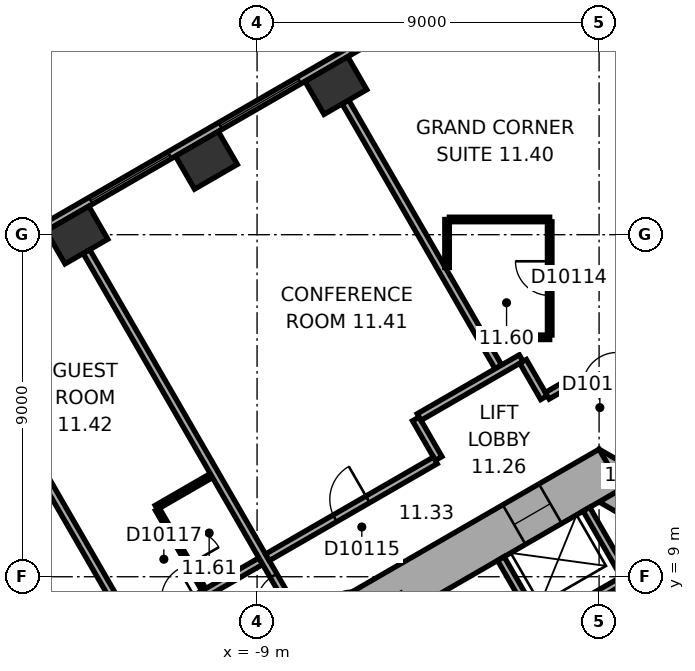
"""IFC4 building model, lengths in metres.
Left out: names, types, materials, properties, quantities, classifications, styles, units other than length and angle.
Written with IfcOpenShell. Run it as: python <this file> out.ifc"""

import sys

from ifc_helpers import new_model, si_unit, direction, frame, frame_2d, origin, origin_2d, place, context, subcontext, project, spatial, rectangle, extrude, element, fill, save


model = new_model("IFC4")
c1 = context("Model", 3, precision=1e-05, world=origin(), true_north=direction((0.0, 1.0)))
c2 = subcontext(c1, "Body", "Model", "MODEL_VIEW")
j1 = project(units=[si_unit("LENGTHUNIT", "METRE"), si_unit("PLANEANGLEUNIT", "RADIAN")], contexts=[c1])
p1 = place(None, origin())
s1 = spatial("IfcSite", under=j1, at=p1, CompositionType="ELEMENT")
p2 = place(p1, origin())
s2 = spatial("IfcBuilding", under=s1, at=p2, CompositionType="ELEMENT")
p3 = place(p2, frame((0.0, 0.0, 57.2)))
s3 = spatial("IfcBuildingStorey", under=s2, at=p3, CompositionType="ELEMENT", Elevation=57.2)
for number, where, z_axis, x_axis in (
    (1, (-6.926, 21.925, 0.0), (0.0, 0.0, 1.0), (-0.866, -0.5, 0.0)),
    (2, (-10.333, 19.957, 0.0), (0.0, 0.0, 1.0), (-0.866, -0.5, 0.0)),
    (3, (-13.74, 17.99, 0.0), (0.0, 0.0, 1.0), (-0.866, -0.5, 0.0)),
):
    element("IfcColumn", number, at=place(p3, frame(where, z_axis=z_axis, x_axis=x_axis)), inside=s3, PredefinedType="COLUMN", context=c2, shape_type="SweptSolid", body=[
        extrude(rectangle(XDim=1.3, YDim=1.0, at=origin_2d()), origin(), (0.0, 0.0, 1.0), 3.3),
    ])
p4 = place(p3, frame((10.4, 5.658, 0.0), z_axis=(0.0, 0.0, 1.0), x_axis=(-0.866021384402, 0.500006961711, 0.0)))
e4 = element("IfcWall", 4, at=p4, inside=s3, PredefinedType="SHEAR", context=c2, shape_type="SweptSolid", body=[
    extrude(rectangle(XDim=12.355, YDim=1.2, at=frame_2d((6.178, 0.0))), origin(), (0.0, 0.0, 1.0), 3.3),
])
p5 = place(p4, frame((2.728, 0.0, 0.0)))
e5 = element("IfcOpeningElement", 5, at=p5, cuts=e4, PredefinedType="OPENING", context=c2, shape_type="SweptSolid", body=[
    extrude(rectangle(XDim=1.1, YDim=2.1, at=frame_2d((0.55, 1.05))), frame((0.0, 0.61, 0.0), z_axis=(0.0, -1.0, 0.0), x_axis=(1.0, 0.0, 0.0)), (0.0, 0.0, 1.0), 1.22),
])
p6 = place(p4, frame((5.328, 0.0, 0.0)))
e6 = element("IfcOpeningElement", 6, at=p6, cuts=e4, PredefinedType="OPENING", context=c2, shape_type="SweptSolid", body=[
    extrude(rectangle(XDim=1.1, YDim=2.1, at=frame_2d((0.55, 1.05))), frame((0.0, 0.61, 0.0), z_axis=(0.0, -1.0, 0.0), x_axis=(1.0, 0.0, 0.0)), (0.0, 0.0, 1.0), 1.22),
])
p7 = place(p4, frame((7.928, 0.0, 0.0)))
e7 = element("IfcOpeningElement", 7, at=p7, cuts=e4, PredefinedType="OPENING", context=c2, shape_type="SweptSolid", body=[
    extrude(rectangle(XDim=1.1, YDim=2.1, at=frame_2d((0.55, 1.05))), frame((0.0, 0.61, 0.0), z_axis=(0.0, -1.0, 0.0), x_axis=(1.0, 0.0, 0.0)), (0.0, 0.0, 1.0), 1.22),
])
p8 = place(p3, frame((0.3, 11.836, 0.0), z_axis=(0.0, 0.0, 1.0), x_axis=(-0.866021384402, -0.500006961711, 0.0)))
e8 = element("IfcWall", 8, at=p8, inside=s3, PredefinedType="SHEAR", context=c2, shape_type="SweptSolid", body=[
    extrude(rectangle(XDim=12.355, YDim=1.2, at=frame_2d((6.178, 0.0))), origin(), (0.0, 0.0, 1.0), 3.3),
])
p9 = place(p8, frame((6.378, 0.0, 0.0)))
e9 = element("IfcOpeningElement", 9, at=p9, cuts=e8, PredefinedType="OPENING", context=c2, shape_type="SweptSolid", body=[
    extrude(rectangle(XDim=1.5, YDim=2.1, at=frame_2d((0.75, 1.05))), frame((0.0, 0.61, 0.0), z_axis=(0.0, -1.0, 0.0), x_axis=(1.0, 0.0, 0.0)), (0.0, 0.0, 1.0), 1.22),
])
p10 = place(p8, frame((1.828, 0.0, 0.0)))
e10 = element("IfcOpeningElement", 10, at=p10, cuts=e8, PredefinedType="OPENING", context=c2, shape_type="SweptSolid", body=[
    extrude(rectangle(XDim=1.1, YDim=2.1, at=frame_2d((0.55, 1.05))), frame((0.0, 0.61, 0.0), z_axis=(0.0, -1.0, 0.0), x_axis=(1.0, 0.0, 0.0)), (0.0, 0.0, 1.0), 1.22),
])
p11 = place(p3, frame((-3.136, 24.805, 0.0), z_axis=(0.0, 0.0, 1.0), x_axis=(-0.866028291626, -0.499994998079, 0.0)))
e11 = element("IfcWall", 11, at=p11, inside=s3, PredefinedType="STANDARD", context=c2, shape_type="SweptSolid", body=[
    extrude(rectangle(XDim=21.246, YDim=0.2, at=frame_2d((10.623, 0.0))), origin(), (0.0, 0.0, 1.0), 3.3),
])
p12 = place(p11, frame((1.555, 0.0, 0.8)))
e12 = element("IfcOpeningElement", 12, at=p12, cuts=e11, PredefinedType="OPENING", context=c2, shape_type="SweptSolid", body=[
    extrude(rectangle(XDim=2.4, YDim=1.7, at=frame_2d((1.2, 0.85))), frame((0.0, 0.11, 0.0), z_axis=(0.0, -1.0, 0.0), x_axis=(1.0, 0.0, 0.0)), (0.0, 0.0, 1.0), 0.22),
])
p13 = place(p11, frame((5.489, 0.0, 0.8)))
e13 = element("IfcOpeningElement", 13, at=p13, cuts=e11, PredefinedType="OPENING", context=c2, shape_type="SweptSolid", body=[
    extrude(rectangle(XDim=2.4, YDim=1.7, at=frame_2d((1.2, 0.85))), frame((0.0, 0.11, 0.0), z_axis=(0.0, -1.0, 0.0), x_axis=(1.0, 0.0, 0.0)), (0.0, 0.0, 1.0), 0.22),
])
p14 = place(p11, frame((9.424, 0.0, 0.8)))
e14 = element("IfcOpeningElement", 14, at=p14, cuts=e11, PredefinedType="OPENING", context=c2, shape_type="SweptSolid", body=[
    extrude(rectangle(XDim=2.4, YDim=1.7, at=frame_2d((1.2, 0.85))), frame((0.0, 0.11, 0.0), z_axis=(0.0, -1.0, 0.0), x_axis=(1.0, 0.0, 0.0)), (0.0, 0.0, 1.0), 0.22),
])
p15 = place(p11, frame((13.358, 0.0, 0.8)))
e15 = element("IfcOpeningElement", 15, at=p15, cuts=e11, PredefinedType="OPENING", context=c2, shape_type="SweptSolid", body=[
    extrude(rectangle(XDim=2.4, YDim=1.7, at=frame_2d((1.2, 0.85))), frame((0.0, 0.11, 0.0), z_axis=(0.0, -1.0, 0.0), x_axis=(1.0, 0.0, 0.0)), (0.0, 0.0, 1.0), 0.22),
])
p16 = place(p11, frame((17.293, 0.0, 0.8)))
e16 = element("IfcOpeningElement", 16, at=p16, cuts=e11, PredefinedType="OPENING", context=c2, shape_type="SweptSolid", body=[
    extrude(rectangle(XDim=2.4, YDim=1.7, at=frame_2d((1.2, 0.85))), frame((0.0, 0.11, 0.0), z_axis=(0.0, -1.0, 0.0), x_axis=(1.0, 0.0, 0.0)), (0.0, 0.0, 1.0), 0.22),
])
p17 = place(p3, frame((0.803, 9.009, 0.0), z_axis=(0.0, 0.0, 1.0), x_axis=(-0.866028230842, -0.499995103361, 0.0)))
e17 = element("IfcWall", 17, at=p17, inside=s3, PredefinedType="PARTITIONING", context=c2, shape_type="SweptSolid", body=[
    extrude(rectangle(XDim=5.4, YDim=0.2, at=frame_2d((2.7, 0.0))), origin(), (0.0, 0.0, 1.0), 3.05),
])
p18 = place(p3, frame((0.767, 8.872, 0.0), z_axis=(0.0, 0.0, 1.0), x_axis=(-0.499994660107, 0.866028486751, 0.0)))
e18 = element("IfcWall", 18, at=p18, inside=s3, PredefinedType="PARTITIONING", context=c2, shape_type="SweptSolid", body=[
    extrude(rectangle(XDim=2.2, YDim=0.2, at=frame_2d((1.1, 0.0))), origin(), (0.0, 0.0, 1.0), 3.05),
])
p19 = place(p3, frame((-1.485, 7.572, 0.0), z_axis=(0.0, 0.0, 1.0), x_axis=(-0.50002983664, 0.866008176907, 0.0)))
e19 = element("IfcWall", 19, at=p19, inside=s3, PredefinedType="PARTITIONING", context=c2, shape_type="SweptSolid", body=[
    extrude(rectangle(XDim=2.2, YDim=0.2, at=frame_2d((1.1, 0.0))), origin(), (0.0, 0.0, 1.0), 3.05),
])
p20 = place(p3, frame((-16.898, 15.59, 0.0), z_axis=(0.0, 0.0, 1.0), x_axis=(0.500023458698, -0.866011859475, 0.0)))
e20 = element("IfcWall", 20, at=p20, inside=s3, PredefinedType="PARTITIONING", context=c2, shape_type="SweptSolid", body=[
    extrude(rectangle(XDim=9.572, YDim=0.2, at=frame_2d((4.786, 0.0))), origin(), (0.0, 0.0, 1.0), 3.05),
])
p21 = place(p3, frame((-11.651, 10.825, 0.0), z_axis=(0.0, 0.0, 1.0), x_axis=(0.865998477143, 0.500046635412, 0.0)))
e21 = element("IfcWall", 21, at=p21, inside=s3, PredefinedType="PARTITIONING", context=c2, shape_type="SweptSolid", body=[
    extrude(rectangle(XDim=1.673, YDim=0.12, at=frame_2d((0.836, 0.0))), origin(), (0.0, 0.0, 1.0), 3.05),
])
p22 = place(p3, frame((-10.401, 8.66, 0.0), z_axis=(0.0, 0.0, 1.0), x_axis=(-0.500077547548, 0.865980627057, 0.0)))
e22 = element("IfcWall", 22, at=p22, inside=s3, PredefinedType="PARTITIONING", context=c2, shape_type="SweptSolid", body=[
    extrude(rectangle(XDim=2.44, YDim=0.12, at=frame_2d((1.22, 0.0))), origin(), (0.0, 0.0, 1.0), 3.05),
])
p23 = place(p22, frame((0.77, 0.0, 0.0)))
e23 = element("IfcOpeningElement", 23, at=p23, cuts=e22, PredefinedType="OPENING", context=c2, shape_type="SweptSolid", body=[
    extrude(rectangle(XDim=0.9, YDim=2.1, at=frame_2d((0.45, 1.05))), frame((0.0, 0.07, 0.0), z_axis=(0.0, -1.0, 0.0), x_axis=(1.0, 0.0, 0.0)), (0.0, 0.0, 1.0), 0.14),
])
p24 = place(p3, frame((-8.902, 9.41, 0.0), z_axis=(0.0, 0.0, 1.0), x_axis=(-0.866014299198, -0.500019233215, 0.0)))
e24 = element("IfcWall", 24, at=p24, inside=s3, PredefinedType="PARTITIONING", context=c2, shape_type="SweptSolid", body=[
    extrude(rectangle(XDim=3.133, YDim=0.2, at=frame_2d((1.567, 0.0))), origin(), (0.0, 0.0, 1.0), 3.05),
])
p25 = place(p24, frame((1.978, 0.0, 0.0)))
e25 = element("IfcOpeningElement", 25, at=p25, cuts=e24, PredefinedType="OPENING", context=c2, shape_type="SweptSolid", body=[
    extrude(rectangle(XDim=0.9, YDim=2.1, at=frame_2d((0.45, 1.05))), frame((0.0, 0.11, 0.0), z_axis=(0.0, -1.0, 0.0), x_axis=(1.0, 0.0, 0.0)), (0.0, 0.0, 1.0), 0.22),
])
p26 = place(p3, frame((-7.865, 7.814, 0.0), z_axis=(0.0, 0.0, 1.0), x_axis=(-0.500004234368, 0.866022959057, 0.0)))
e26 = element("IfcWall", 26, at=p26, inside=s3, PredefinedType="PARTITIONING", context=c2, shape_type="SweptSolid", body=[
    extrude(rectangle(XDim=11.25, YDim=0.2, at=frame_2d((5.625, 0.0))), origin(), (0.0, 0.0, 1.0), 3.05),
])
p27 = place(p26, frame((0.5, 0.0, 0.0)))
e27 = element("IfcOpeningElement", 27, at=p27, cuts=e26, PredefinedType="OPENING", context=c2, shape_type="SweptSolid", body=[
    extrude(rectangle(XDim=0.9, YDim=2.1, at=frame_2d((0.45, 1.05))), frame((0.0, 0.11, 0.0), z_axis=(0.0, -1.0, 0.0), x_axis=(1.0, 0.0, 0.0)), (0.0, 0.0, 1.0), 0.22),
])
p28 = place(p3, frame((-6.676, 21.492, 0.0), z_axis=(0.0, 0.0, 1.0), x_axis=(0.500011263043, -0.866018900966, 0.0)))
e28 = element("IfcWall", 28, at=p28, inside=s3, PredefinedType="PARTITIONING", context=c2, shape_type="SweptSolid", body=[
    extrude(rectangle(XDim=8.049, YDim=0.2, at=frame_2d((4.024, 0.0))), origin(), (0.0, 0.0, 1.0), 3.05),
])
p29 = place(p3, frame((-4.823, 13.152, 0.0), z_axis=(0.0, 0.0, 1.0), x_axis=(0.499986357472, -0.866033280158, 0.0)))
e29 = element("IfcWall", 29, at=p29, inside=s3, PredefinedType="PARTITIONING", context=c2, shape_type="SweptSolid", body=[
    extrude(rectangle(XDim=1.201, YDim=0.2, at=frame_2d((0.601, 0.0))), origin(), (0.0, 0.0, 1.0), 3.05),
])
p30 = place(p3, frame((-4.309, 12.061, 0.0), z_axis=(0.0, 0.0, 1.0), x_axis=(-0.866020679205, -0.500008183122, 0.0)))
e30 = element("IfcWall", 30, at=p30, inside=s3, PredefinedType="PARTITIONING", context=c2, shape_type="SweptSolid", body=[
    extrude(rectangle(XDim=5.104, YDim=0.2, at=frame_2d((2.552, 0.0))), origin(), (0.0, 0.0, 1.0), 3.05),
])
p31 = place(p30, frame((2.052, 0.0, 0.0)))
e31 = element("IfcOpeningElement", 31, at=p31, cuts=e30, PredefinedType="OPENING", context=c2, shape_type="SweptSolid", body=[
    extrude(rectangle(XDim=1.0, YDim=2.1, at=frame_2d((0.5, 1.05))), frame((0.0, 0.11, 0.0), z_axis=(0.0, -1.0, 0.0), x_axis=(1.0, 0.0, 0.0)), (0.0, 0.0, 1.0), 0.22),
])
p32 = place(p3, frame((-4.0, 17.137, 0.0), z_axis=(0.0, 0.0, 1.0), x_axis=(0.0, 1.0, 0.0)))
e32 = element("IfcWall", 32, at=p32, inside=s3, PredefinedType="PARTITIONING", context=c2, shape_type="SweptSolid", body=[
    extrude(rectangle(XDim=1.263, YDim=0.12, at=frame_2d((0.632, 0.0))), origin(), (0.0, 0.0, 1.0), 3.05),
])
p33 = place(p3, frame((-3.94, 18.401, 0.0), z_axis=(0.0, 0.0, 1.0), x_axis=(1.0, 0.0, 0.0)))
e33 = element("IfcWall", 33, at=p33, inside=s3, PredefinedType="PARTITIONING", context=c2, shape_type="SweptSolid", body=[
    extrude(rectangle(XDim=2.64, YDim=0.12, at=frame_2d((1.32, 0.0))), origin(), (0.0, 0.0, 1.0), 3.05),
])
p34 = place(p3, frame((-2.05, 14.752, 0.0), z_axis=(0.0, 0.0, 1.0), x_axis=(-0.866030936828, -0.499990416364, 0.0)))
e34 = element("IfcWall", 34, at=p34, inside=s3, PredefinedType="PARTITIONING", context=c2, shape_type="SweptSolid", body=[
    extrude(rectangle(XDim=3.102, YDim=0.2, at=frame_2d((1.551, 0.0))), origin(), (0.0, 0.0, 1.0), 3.05),
])
p35 = place(p3, frame((-1.449, 13.712, 0.0), z_axis=(0.0, 0.0, 1.0), x_axis=(-0.499978356969, 0.866037899034, 0.0)))
e35 = element("IfcWall", 35, at=p35, inside=s3, PredefinedType="PARTITIONING", context=c2, shape_type="SweptSolid", body=[
    extrude(rectangle(XDim=1.101, YDim=0.2, at=frame_2d((0.551, 0.0))), origin(), (0.0, 0.0, 1.0), 3.05),
])
p36 = place(p3, frame((-1.3, 15.301, 0.0), z_axis=(0.0, 0.0, 1.0), x_axis=(-1.0, 0.0, 0.0)))
e36 = element("IfcWall", 36, at=p36, inside=s3, PredefinedType="PARTITIONING", context=c2, shape_type="SweptSolid", body=[
    extrude(rectangle(XDim=1.661, YDim=0.12, at=frame_2d((0.831, 0.0))), origin(), (0.0, 0.0, 1.0), 3.05),
])
p37 = place(p3, frame((-1.3, 18.341, 0.0), z_axis=(0.0, 0.0, 1.0), x_axis=(0.0, -1.0, 0.0)))
e37 = element("IfcWall", 37, at=p37, inside=s3, PredefinedType="PARTITIONING", context=c2, shape_type="SweptSolid", body=[
    extrude(rectangle(XDim=2.98, YDim=0.12, at=frame_2d((1.49, 0.0))), origin(), (0.0, 0.0, 1.0), 3.05),
])
p38 = place(p37, frame((1.04, 0.0, 0.0)))
e38 = element("IfcOpeningElement", 38, at=p38, cuts=e37, PredefinedType="OPENING", context=c2, shape_type="SweptSolid", body=[
    extrude(rectangle(XDim=0.9, YDim=2.1, at=frame_2d((0.45, 1.05))), frame((0.0, 0.07, 0.0), z_axis=(0.0, -1.0, 0.0), x_axis=(1.0, 0.0, 0.0)), (0.0, 0.0, 1.0), 0.14),
])
p39 = place(p3, frame((-0.95, 14.001, 0.0), z_axis=(0.0, 0.0, 1.0), x_axis=(-0.86609177584, -0.499885022602, 0.0)))
e39 = element("IfcWall", 39, at=p39, inside=s3, PredefinedType="PARTITIONING", context=c2, shape_type="SweptSolid", body=[
    extrude(rectangle(XDim=0.477, YDim=0.2, at=frame_2d((0.238, 0.0))), origin(), (0.0, 0.0, 1.0), 3.05),
])
p40 = place(p3, frame((0.95, 14.001, 0.0), z_axis=(0.0, 0.0, 1.0), x_axis=(-1.0, 0.0, 0.0)))
e40 = element("IfcWall", 40, at=p40, inside=s3, PredefinedType="PARTITIONING", context=c2, shape_type="SweptSolid", body=[
    extrude(rectangle(XDim=1.86, YDim=0.2, at=frame_2d((0.93, 0.0))), origin(), (0.0, 0.0, 1.0), 3.05),
])
p41 = place(p40, frame((0.48, 0.0, 0.0)))
e41 = element("IfcOpeningElement", 41, at=p41, cuts=e40, PredefinedType="OPENING", context=c2, shape_type="SweptSolid", body=[
    extrude(rectangle(XDim=0.9, YDim=2.1, at=frame_2d((0.45, 1.05))), frame((0.0, 0.11, 0.0), z_axis=(0.0, -1.0, 0.0), x_axis=(1.0, 0.0, 0.0)), (0.0, 0.0, 1.0), 0.22),
])
p42 = place(p13, origin())
e42 = element("IfcWindow", 42, at=p42, inside=s3, PartitioningType="SINGLE_PANEL", PredefinedType="WINDOW", context=c2, shape_type="SweptSolid", body=[
    extrude(rectangle(XDim=2.4, YDim=1.7, at=frame_2d((1.2, 0.85))), frame((0.0, 0.03, 0.0), z_axis=(0.0, -1.0, 0.0), x_axis=(1.0, 0.0, 0.0)), (0.0, 0.0, 1.0), 0.06),
])
fill(e13, e42)
p43 = place(p14, origin())
e43 = element("IfcWindow", 43, at=p43, inside=s3, PartitioningType="SINGLE_PANEL", PredefinedType="WINDOW", context=c2, shape_type="SweptSolid", body=[
    extrude(rectangle(XDim=2.4, YDim=1.7, at=frame_2d((1.2, 0.85))), frame((0.0, 0.03, 0.0), z_axis=(0.0, -1.0, 0.0), x_axis=(1.0, 0.0, 0.0)), (0.0, 0.0, 1.0), 0.06),
])
fill(e14, e43)
p44 = place(p9, origin())
e44 = element("IfcDoor", 44, at=p44, inside=s3, OperationType="DOUBLE_DOOR_SINGLE_SWING", PredefinedType="DOOR", context=c2, shape_type="SweptSolid", body=[
    extrude(rectangle(XDim=1.5, YDim=2.1, at=frame_2d((0.75, 1.05))), frame((0.0, 0.025, 0.0), z_axis=(0.0, -1.0, 0.0), x_axis=(1.0, 0.0, 0.0)), (0.0, 0.0, 1.0), 0.05),
])
fill(e9, e44)
p45 = place(p10, origin())
e45 = element("IfcDoor", 45, at=p45, inside=s3, OperationType="DOUBLE_DOOR_SLIDING", PredefinedType="DOOR", context=c2, shape_type="SweptSolid", body=[
    extrude(rectangle(XDim=1.1, YDim=2.1, at=frame_2d((0.55, 1.05))), frame((0.0, 0.025, 0.0), z_axis=(0.0, -1.0, 0.0), x_axis=(1.0, 0.0, 0.0)), (0.0, 0.0, 1.0), 0.05),
])
fill(e10, e45)
p46 = place(p41, origin())
e46 = element("IfcDoor", 46, at=p46, inside=s3, OperationType="SINGLE_SWING_LEFT", PredefinedType="DOOR", context=c2, shape_type="SweptSolid", body=[
    extrude(rectangle(XDim=0.9, YDim=2.1, at=frame_2d((0.45, 1.05))), frame((0.0, 0.025, 0.0), z_axis=(0.0, -1.0, 0.0), x_axis=(1.0, 0.0, 0.0)), (0.0, 0.0, 1.0), 0.05),
])
fill(e41, e46)
p47 = place(p38, origin())
e47 = element("IfcDoor", 47, at=p47, inside=s3, OperationType="SINGLE_SWING_LEFT", PredefinedType="DOOR", context=c2, shape_type="SweptSolid", body=[
    extrude(rectangle(XDim=0.9, YDim=2.1, at=frame_2d((0.45, 1.05))), frame((0.0, 0.025, 0.0), z_axis=(0.0, -1.0, 0.0), x_axis=(1.0, 0.0, 0.0)), (0.0, 0.0, 1.0), 0.05),
])
fill(e38, e47)
p48 = place(p31, origin())
e48 = element("IfcDoor", 48, at=p48, inside=s3, OperationType="SINGLE_SWING_LEFT", PredefinedType="DOOR", context=c2, shape_type="SweptSolid", body=[
    extrude(rectangle(XDim=1.0, YDim=2.1, at=frame_2d((0.5, 1.05))), frame((0.0, 0.025, 0.0), z_axis=(0.0, -1.0, 0.0), x_axis=(1.0, 0.0, 0.0)), (0.0, 0.0, 1.0), 0.05),
])
fill(e31, e48)
p49 = place(p23, origin())
e49 = element("IfcDoor", 49, at=p49, inside=s3, OperationType="SINGLE_SWING_LEFT", PredefinedType="DOOR", context=c2, shape_type="SweptSolid", body=[
    extrude(rectangle(XDim=0.9, YDim=2.1, at=frame_2d((0.45, 1.05))), frame((0.0, 0.025, 0.0), z_axis=(0.0, -1.0, 0.0), x_axis=(1.0, 0.0, 0.0)), (0.0, 0.0, 1.0), 0.05),
])
fill(e23, e49)
p50 = place(p27, origin())
e50 = element("IfcDoor", 50, at=p50, inside=s3, OperationType="SINGLE_SWING_LEFT", PredefinedType="DOOR", context=c2, shape_type="SweptSolid", body=[
    extrude(rectangle(XDim=0.9, YDim=2.1, at=frame_2d((0.45, 1.05))), frame((0.0, 0.025, 0.0), z_axis=(0.0, -1.0, 0.0), x_axis=(1.0, 0.0, 0.0)), (0.0, 0.0, 1.0), 0.05),
])
fill(e27, e50)
save(model, sys.argv[1])
